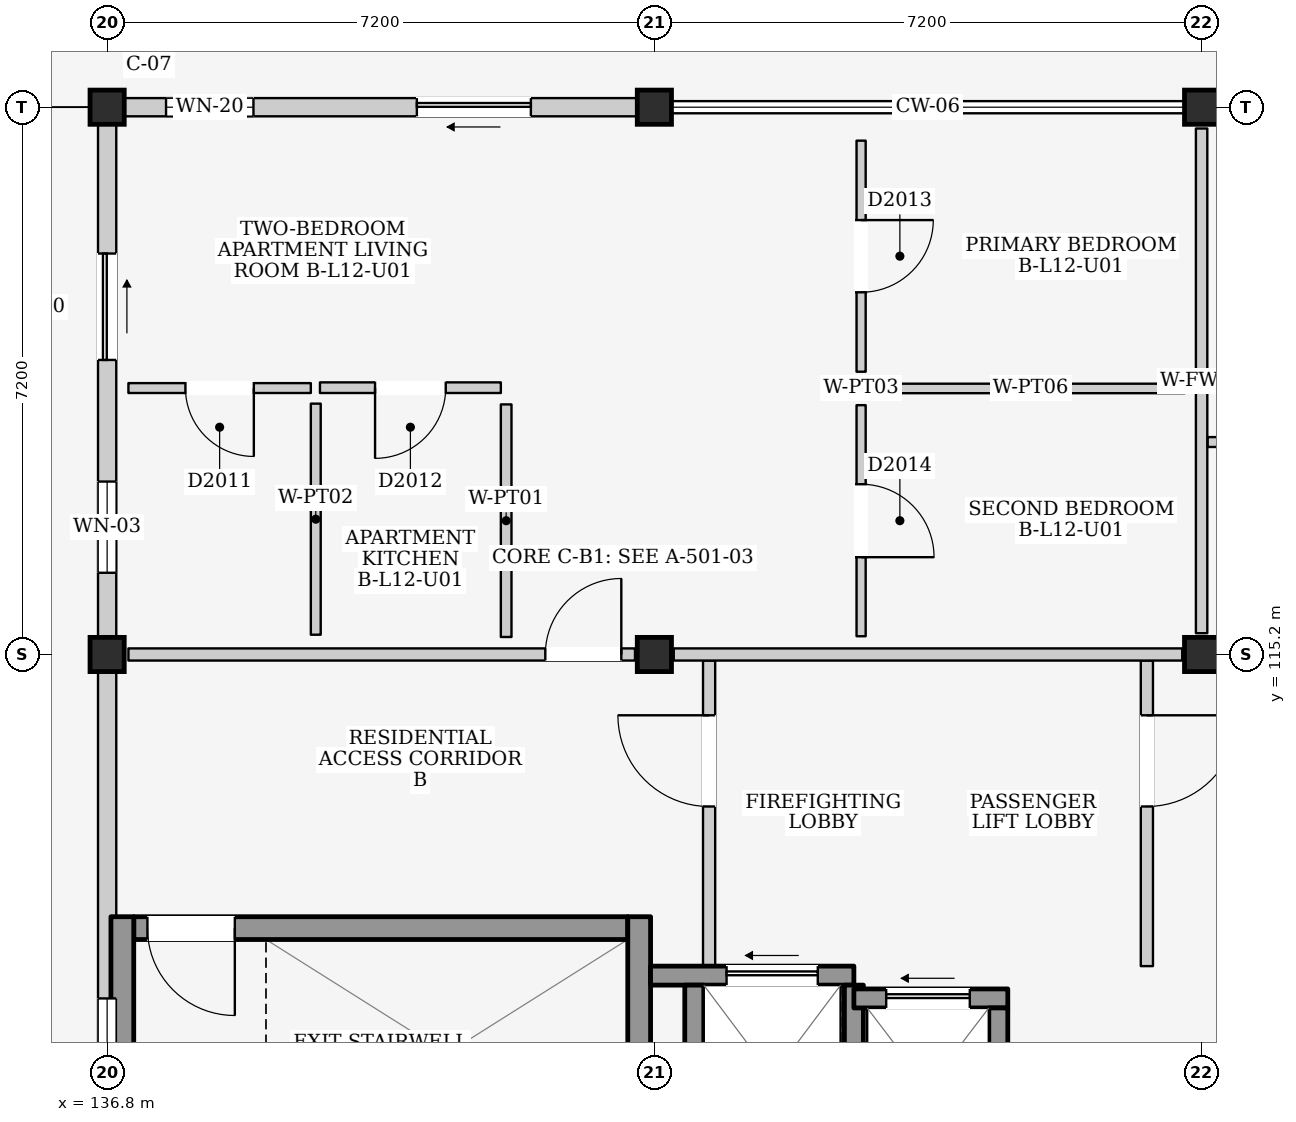
"""IFC4 building model, lengths in metres.
Left out: names, types, materials, properties, quantities, classifications, styles, units other than length and angle.
Written with IfcOpenShell. Run it as: python <this file> out.ifc"""

import sys

from ifc_helpers import new_model, si_unit, direction, frame, frame_2d, origin, origin_2d, place, context, subcontext, project, spatial, rectangle, extrude, element, fill, save


model = new_model("IFC4")
c1 = context("Model", 3, precision=1e-05, world=origin(), true_north=direction((0.0, 1.0)))
c2 = subcontext(c1, "Body", "Model", "MODEL_VIEW")
j1 = project(units=[si_unit("LENGTHUNIT", "METRE"), si_unit("PLANEANGLEUNIT", "RADIAN")], contexts=[c1])
p1 = place(None, origin())
s1 = spatial("IfcSite", under=j1, at=p1, CompositionType="ELEMENT")
p2 = place(p1, origin())
s2 = spatial("IfcBuilding", under=s1, at=p2, CompositionType="ELEMENT")
p3 = place(p2, frame((0.0, 0.0, 41.2)))
s3 = spatial("IfcBuildingStorey", under=s2, at=p3, CompositionType="ELEMENT", Elevation=41.2)
for number, where, z_axis, x_axis in (
    (1, (136.8, 115.2, 0.0), (0.0, 0.0, 1.0), (1.0, 0.0, 0.0)),
    (2, (136.8, 122.4, 0.0), (0.0, 0.0, 1.0), (1.0, 0.0, 0.0)),
    (3, (144.0, 115.2, 0.0), (0.0, 0.0, 1.0), (1.0, 0.0, 0.0)),
    (4, (144.0, 122.4, 0.0), (0.0, 0.0, 1.0), (1.0, 0.0, 0.0)),
    (5, (151.2, 115.2, 0.0), (0.0, 0.0, 1.0), (1.0, 0.0, 0.0)),
    (6, (151.2, 122.4, 0.0), (0.0, 0.0, 1.0), (1.0, 0.0, 0.0)),
):
    element("IfcColumn", number, at=place(p3, frame(where, z_axis=z_axis, x_axis=x_axis)), inside=s3, PredefinedType="COLUMN", context=c2, shape_type="SweptSolid", body=[
        extrude(rectangle(XDim=0.45, YDim=0.45, at=origin_2d()), origin(), (0.0, 0.0, 1.0), 3.2),
    ])
p4 = place(p3, frame((136.8, 108.225, 0.0), z_axis=(0.0, 0.0, 1.0), x_axis=(0.0, 1.0, 0.0)))
e7 = element("IfcWall", 7, at=p4, inside=s3, PredefinedType="ELEMENTEDWALL", context=c2, shape_type="SweptSolid", body=[
    extrude(rectangle(XDim=6.75, YDim=0.24, at=frame_2d((3.375, 0.0))), origin(), (0.0, 0.0, 1.0), 2.445),
])
p5 = place(p4, frame((1.45, 0.0, 1.2)))
e8 = element("IfcOpeningElement", 8, at=p5, cuts=e7, PredefinedType="OPENING", context=c2, shape_type="SweptSolid", body=[
    extrude(rectangle(XDim=1.0, YDim=0.9, at=frame_2d((0.5, 0.45))), frame((0.0, 0.135, 0.0), z_axis=(0.0, -1.0, 0.0), x_axis=(1.0, 0.0, 0.0)), (0.0, 0.0, 1.0), 0.27),
])
p6 = place(p3, frame((137.025, 122.4, 0.0), z_axis=(0.0, 0.0, 1.0), x_axis=(1.0, 0.0, 0.0)))
e9 = element("IfcWall", 9, at=p6, inside=s3, PredefinedType="ELEMENTEDWALL", context=c2, shape_type="SweptSolid", body=[
    extrude(rectangle(XDim=6.75, YDim=0.24, at=frame_2d((3.375, 0.0))), origin(), (0.0, 0.0, 1.0), 2.495),
])
p7 = place(p6, frame((3.85, 0.0, 0.0)))
e10 = element("IfcOpeningElement", 10, at=p7, cuts=e9, PredefinedType="OPENING", context=c2, shape_type="SweptSolid", body=[
    extrude(rectangle(XDim=1.5, YDim=2.12, at=frame_2d((0.75, 1.06))), frame((0.0, 0.135, 0.0), z_axis=(0.0, -1.0, 0.0), x_axis=(1.0, 0.0, 0.0)), (0.0, 0.0, 1.0), 0.27),
])
p8 = place(p6, frame((0.55, 0.0, 0.9)))
e11 = element("IfcOpeningElement", 11, at=p8, cuts=e9, PredefinedType="OPENING", context=c2, shape_type="SweptSolid", body=[
    extrude(rectangle(XDim=1.15, YDim=1.15, at=frame_2d((0.575, 0.575))), frame((0.0, 0.135, 0.0), z_axis=(0.0, -1.0, 0.0), x_axis=(1.0, 0.0, 0.0)), (0.0, 0.0, 1.0), 0.27),
])
p9 = place(p3, frame((136.8, 115.425, 0.0), z_axis=(0.0, 0.0, 1.0), x_axis=(0.0, 1.0, 0.0)))
e12 = element("IfcWall", 12, at=p9, inside=s3, PredefinedType="ELEMENTEDWALL", context=c2, shape_type="SweptSolid", body=[
    extrude(rectangle(XDim=6.75, YDim=0.24, at=frame_2d((3.375, 0.0))), origin(), (0.0, 0.0, 1.0), 2.445),
])
p10 = place(p9, frame((3.65, 0.0, 0.0)))
e13 = element("IfcOpeningElement", 13, at=p10, cuts=e12, PredefinedType="OPENING", context=c2, shape_type="SweptSolid", body=[
    extrude(rectangle(XDim=1.4, YDim=2.1, at=frame_2d((0.7, 1.05))), frame((0.0, 0.135, 0.0), z_axis=(0.0, -1.0, 0.0), x_axis=(1.0, 0.0, 0.0)), (0.0, 0.0, 1.0), 0.27),
])
p11 = place(p9, frame((0.85, 0.0, 0.95)))
e14 = element("IfcOpeningElement", 14, at=p11, cuts=e12, PredefinedType="OPENING", context=c2, shape_type="SweptSolid", body=[
    extrude(rectangle(XDim=1.2, YDim=1.35, at=frame_2d((0.6, 0.675))), frame((0.0, 0.135, 0.0), z_axis=(0.0, -1.0, 0.0), x_axis=(1.0, 0.0, 0.0)), (0.0, 0.0, 1.0), 0.27),
])
p12 = place(p3, frame((137.15, 111.6, 0.0), z_axis=(0.0, 0.0, 1.0), x_axis=(1.0, 0.0, 0.0)))
e15 = element("IfcWall", 15, at=p12, inside=s3, PredefinedType="SHEAR", context=c2, shape_type="SweptSolid", body=[
    extrude(rectangle(XDim=6.5, YDim=0.3, at=frame_2d((3.25, 0.0))), origin(), (0.0, 0.0, 1.0), 2.95),
])
p13 = place(p12, frame((0.18, 0.0, 0.0)))
e16 = element("IfcOpeningElement", 16, at=p13, cuts=e15, PredefinedType="OPENING", context=c2, shape_type="SweptSolid", body=[
    extrude(rectangle(XDim=1.15, YDim=2.2, at=frame_2d((0.575, 1.1))), frame((0.0, 0.165, 0.0), z_axis=(0.0, -1.0, 0.0), x_axis=(1.0, 0.0, 0.0)), (0.0, 0.0, 1.0), 0.33),
])
for number, where, z_axis, x_axis in (
    (17, (137.0, 108.15, 0.0), (0.0, 0.0, 1.0), (0.0, 1.0, 0.0)),
    (18, (143.8, 108.15, 0.0), (0.0, 0.0, 1.0), (0.0, 1.0, 0.0)),
):
    element("IfcWall", number, at=place(p3, frame(where, z_axis=z_axis, x_axis=x_axis)), inside=s3, PredefinedType="SHEAR", context=c2, shape_type="SweptSolid", body=[
        extrude(rectangle(XDim=3.6, YDim=0.3, at=frame_2d((1.8, 0.0))), origin(), (0.0, 0.0, 1.0), 2.95),
    ])
p14 = place(p3, frame((144.72, 111.1, 0.0), z_axis=(0.0, 0.0, 1.0), x_axis=(0.0, 1.0, 0.0)))
e19 = element("IfcWall", 19, at=p14, inside=s3, PredefinedType="PARTITIONING", context=c2, shape_type="SweptSolid", body=[
    extrude(rectangle(XDim=4.02, YDim=0.16, at=frame_2d((2.01, 0.0))), origin(), (0.0, 0.0, 1.0), 2.95),
])
p15 = place(p14, frame((2.1, 0.0, 0.0)))
e20 = element("IfcOpeningElement", 20, at=p15, cuts=e19, PredefinedType="OPENING", context=c2, shape_type="SweptSolid", body=[
    extrude(rectangle(XDim=1.2, YDim=2.2, at=frame_2d((0.6, 1.1))), frame((0.0, 0.095, 0.0), z_axis=(0.0, -1.0, 0.0), x_axis=(1.0, 0.0, 0.0)), (0.0, 0.0, 1.0), 0.19),
])
p16 = place(p3, frame((150.48, 111.1, 0.0), z_axis=(0.0, 0.0, 1.0), x_axis=(0.0, 1.0, 0.0)))
e21 = element("IfcWall", 21, at=p16, inside=s3, PredefinedType="PARTITIONING", context=c2, shape_type="SweptSolid", body=[
    extrude(rectangle(XDim=4.02, YDim=0.16, at=frame_2d((2.01, 0.0))), origin(), (0.0, 0.0, 1.0), 2.95),
])
p17 = place(p16, frame((2.1, 0.0, 0.0)))
e22 = element("IfcOpeningElement", 22, at=p17, cuts=e21, PredefinedType="OPENING", context=c2, shape_type="SweptSolid", body=[
    extrude(rectangle(XDim=1.2, YDim=2.2, at=frame_2d((0.6, 1.1))), frame((0.0, 0.095, 0.0), z_axis=(0.0, -1.0, 0.0), x_axis=(1.0, 0.0, 0.0)), (0.0, 0.0, 1.0), 0.19),
])
p18 = place(p3, frame((143.95, 110.975, 0.0), z_axis=(0.0, 0.0, 1.0), x_axis=(1.0, 0.0, 0.0)))
e23 = element("IfcWall", 23, at=p18, inside=s3, PredefinedType="SHEAR", context=c2, shape_type="SweptSolid", body=[
    extrude(rectangle(XDim=2.675, YDim=0.25, at=frame_2d((1.337, 0.0))), origin(), (0.0, 0.0, 1.0), 2.95),
])
p19 = place(p18, frame((1.0, 0.0, 0.0)))
e24 = element("IfcOpeningElement", 24, at=p19, cuts=e23, PredefinedType="OPENING", context=c2, shape_type="SweptSolid", body=[
    extrude(rectangle(XDim=1.2, YDim=2.25, at=frame_2d((0.6, 1.125))), frame((0.0, 0.14, 0.0), z_axis=(0.0, -1.0, 0.0), x_axis=(1.0, 0.0, 0.0)), (0.0, 0.0, 1.0), 0.28),
])
for number, where, z_axis, x_axis in (
    (25, (144.525, 108.45, 0.0), (0.0, 0.0, 1.0), (0.0, 1.0, 0.0)),
    (26, (146.625, 108.45, 0.0), (0.0, 0.0, 1.0), (0.0, 1.0, 0.0)),
):
    element("IfcWall", number, at=place(p3, frame(where, z_axis=z_axis, x_axis=x_axis)), inside=s3, PredefinedType="SHEAR", context=c2, shape_type="SweptSolid", body=[
        extrude(rectangle(XDim=2.4, YDim=0.25, at=frame_2d((1.2, 0.0))), origin(), (0.0, 0.0, 1.0), 2.95),
    ])
p20 = place(p3, frame((146.625, 110.675, 0.0), z_axis=(0.0, 0.0, 1.0), x_axis=(1.0, 0.0, 0.0)))
e27 = element("IfcWall", 27, at=p20, inside=s3, PredefinedType="SHEAR", context=c2, shape_type="SweptSolid", body=[
    extrude(rectangle(XDim=2.025, YDim=0.25, at=frame_2d((1.012, 0.0))), origin(), (0.0, 0.0, 1.0), 2.95),
])
p21 = place(p20, frame((0.425, 0.0, 0.0)))
e28 = element("IfcOpeningElement", 28, at=p21, cuts=e27, PredefinedType="OPENING", context=c2, shape_type="SweptSolid", body=[
    extrude(rectangle(XDim=1.1, YDim=2.15, at=frame_2d((0.55, 1.075))), frame((0.0, 0.14, 0.0), z_axis=(0.0, -1.0, 0.0), x_axis=(1.0, 0.0, 0.0)), (0.0, 0.0, 1.0), 0.28),
])
p22 = place(p3, frame((148.525, 108.45, 0.0), z_axis=(0.0, 0.0, 1.0), x_axis=(0.0, 1.0, 0.0)))
e29 = element("IfcWall", 29, at=p22, inside=s3, PredefinedType="SHEAR", context=c2, shape_type="SweptSolid", body=[
    extrude(rectangle(XDim=2.1, YDim=0.25, at=frame_2d((1.05, 0.0))), origin(), (0.0, 0.0, 1.0), 2.95),
])
p23 = place(p3, frame((137.08, 115.2, 0.0), z_axis=(0.0, 0.0, 1.0), x_axis=(1.0, 0.0, 0.0)))
e30 = element("IfcWall", 30, at=p23, inside=s3, PredefinedType="PARTITIONING", context=c2, shape_type="SweptSolid", body=[
    extrude(rectangle(XDim=6.665, YDim=0.16, at=frame_2d((3.333, 0.0))), origin(), (0.0, 0.0, 1.0), 2.345),
])
p24 = place(p23, frame((5.485, 0.0, 0.0)))
e31 = element("IfcOpeningElement", 31, at=p24, cuts=e30, PredefinedType="OPENING", context=c2, shape_type="SweptSolid", body=[
    extrude(rectangle(XDim=1.0, YDim=2.15, at=frame_2d((0.5, 1.075))), frame((0.0, 0.095, 0.0), z_axis=(0.0, -1.0, 0.0), x_axis=(1.0, 0.0, 0.0)), (0.0, 0.0, 1.0), 0.19),
])
p25 = place(p3, frame((144.255, 115.2, 0.0), z_axis=(0.0, 0.0, 1.0), x_axis=(1.0, 0.0, 0.0)))
e32 = element("IfcWall", 32, at=p25, inside=s3, PredefinedType="PARTITIONING", context=c2, shape_type="SweptSolid", body=[
    extrude(rectangle(XDim=6.69, YDim=0.16, at=frame_2d((3.345, 0.0))), origin(), (0.0, 0.0, 1.0), 2.345),
])
p26 = place(p3, frame((151.2, 115.48, 0.0), z_axis=(0.0, 0.0, 1.0), x_axis=(0.0, 1.0, 0.0)))
e33 = element("IfcWall", 33, at=p26, inside=s3, PredefinedType="PARTITIONING", context=c2, shape_type="SweptSolid", body=[
    extrude(rectangle(XDim=6.64, YDim=0.15, at=frame_2d((3.32, 0.0))), origin(), (0.0, 0.0, 1.0), 2.445),
])
p27 = place(p3, frame((137.08, 118.705, 0.0), z_axis=(0.0, 0.0, 1.0), x_axis=(1.0, 0.0, 0.0)))
e34 = element("IfcWall", 34, at=p27, inside=s3, PredefinedType="PARTITIONING", context=c2, shape_type="SweptSolid", body=[
    extrude(rectangle(XDim=2.4, YDim=0.13, at=frame_2d((1.2, 0.0))), origin(), (0.0, 0.0, 1.0), 2.95),
])
p28 = place(p27, frame((0.75, 0.0, 0.0)))
e35 = element("IfcOpeningElement", 35, at=p28, cuts=e34, PredefinedType="OPENING", context=c2, shape_type="SweptSolid", body=[
    extrude(rectangle(XDim=0.9, YDim=2.1, at=frame_2d((0.45, 1.05))), frame((0.0, 0.08, 0.0), z_axis=(0.0, -1.0, 0.0), x_axis=(1.0, 0.0, 0.0)), (0.0, 0.0, 1.0), 0.16),
])
p29 = place(p3, frame((139.545, 115.46, 0.0), z_axis=(0.0, 0.0, 1.0), x_axis=(0.0, 1.0, 0.0)))
e36 = element("IfcWall", 36, at=p29, inside=s3, PredefinedType="PARTITIONING", context=c2, shape_type="SweptSolid", body=[
    extrude(rectangle(XDim=3.04, YDim=0.13, at=frame_2d((1.52, 0.0))), origin(), (0.0, 0.0, 1.0), 2.95),
])
p30 = place(p3, frame((139.6, 118.71, 0.0), z_axis=(0.0, 0.0, 1.0), x_axis=(1.0, 0.0, 0.0)))
e37 = element("IfcWall", 37, at=p30, inside=s3, PredefinedType="PARTITIONING", context=c2, shape_type="SweptSolid", body=[
    extrude(rectangle(XDim=2.38, YDim=0.14, at=frame_2d((1.19, 0.0))), origin(), (0.0, 0.0, 1.0), 2.95),
])
p31 = place(p30, frame((0.725, 0.0, 0.0)))
e38 = element("IfcOpeningElement", 38, at=p31, cuts=e37, PredefinedType="OPENING", context=c2, shape_type="SweptSolid", body=[
    extrude(rectangle(XDim=0.93, YDim=2.14, at=frame_2d((0.465, 1.07))), frame((0.0, 0.085, 0.0), z_axis=(0.0, -1.0, 0.0), x_axis=(1.0, 0.0, 0.0)), (0.0, 0.0, 1.0), 0.17),
])
p32 = place(p3, frame((142.05, 115.43, 0.0), z_axis=(0.0, 0.0, 1.0), x_axis=(0.0, 1.0, 0.0)))
e39 = element("IfcWall", 39, at=p32, inside=s3, PredefinedType="PARTITIONING", context=c2, shape_type="SweptSolid", body=[
    extrude(rectangle(XDim=3.06, YDim=0.14, at=frame_2d((1.53, 0.0))), origin(), (0.0, 0.0, 1.0), 2.95),
])
p33 = place(p3, frame((146.72, 118.92, 0.0), z_axis=(0.0, 0.0, 1.0), x_axis=(0.0, 1.0, 0.0)))
e40 = element("IfcWall", 40, at=p33, inside=s3, PredefinedType="PARTITIONING", context=c2, shape_type="SweptSolid", body=[
    extrude(rectangle(XDim=3.04, YDim=0.12, at=frame_2d((1.52, 0.0))), origin(), (0.0, 0.0, 1.0), 2.95),
])
p34 = place(p33, frame((1.045, 0.0, 0.0)))
e41 = element("IfcOpeningElement", 41, at=p34, cuts=e40, PredefinedType="OPENING", context=c2, shape_type="SweptSolid", body=[
    extrude(rectangle(XDim=0.95, YDim=2.15, at=frame_2d((0.475, 1.075))), frame((0.0, 0.075, 0.0), z_axis=(0.0, -1.0, 0.0), x_axis=(1.0, 0.0, 0.0)), (0.0, 0.0, 1.0), 0.15),
])
p35 = place(p3, frame((146.92, 118.7, 0.0), z_axis=(0.0, 0.0, 1.0), x_axis=(1.0, 0.0, 0.0)))
e42 = element("IfcWall", 42, at=p35, inside=s3, PredefinedType="PARTITIONING", context=c2, shape_type="SweptSolid", body=[
    extrude(rectangle(XDim=4.06, YDim=0.125, at=frame_2d((2.03, 0.0))), origin(), (0.0, 0.0, 1.0), 2.95),
])
p36 = place(p3, frame((146.72, 115.44, 0.0), z_axis=(0.0, 0.0, 1.0), x_axis=(0.0, 1.0, 0.0)))
e43 = element("IfcWall", 43, at=p36, inside=s3, PredefinedType="PARTITIONING", context=c2, shape_type="SweptSolid", body=[
    extrude(rectangle(XDim=3.04, YDim=0.12, at=frame_2d((1.52, 0.0))), origin(), (0.0, 0.0, 1.0), 2.95),
])
p37 = place(p36, frame((1.04, 0.0, 0.0)))
e44 = element("IfcOpeningElement", 44, at=p37, cuts=e43, PredefinedType="OPENING", context=c2, shape_type="SweptSolid", body=[
    extrude(rectangle(XDim=0.96, YDim=2.15, at=frame_2d((0.48, 1.075))), frame((0.0, 0.075, 0.0), z_axis=(0.0, -1.0, 0.0), x_axis=(1.0, 0.0, 0.0)), (0.0, 0.0, 1.0), 0.15),
])
p38 = place(p3, frame((151.28, 117.995, 0.0), z_axis=(0.0, 0.0, 1.0), x_axis=(1.0, 0.0, 0.0)))
e45 = element("IfcWall", 45, at=p38, inside=s3, PredefinedType="PARTITIONING", context=c2, shape_type="SweptSolid", body=[
    extrude(rectangle(XDim=2.35, YDim=0.13, at=frame_2d((1.175, 0.0))), origin(), (0.0, 0.0, 1.0), 2.95),
])
p39 = place(p38, frame((0.725, 0.0, 0.0)))
e46 = element("IfcOpeningElement", 46, at=p39, cuts=e45, PredefinedType="OPENING", context=c2, shape_type="SweptSolid", body=[
    extrude(rectangle(XDim=0.9, YDim=2.1, at=frame_2d((0.45, 1.05))), frame((0.0, 0.08, 0.0), z_axis=(0.0, -1.0, 0.0), x_axis=(1.0, 0.0, 0.0)), (0.0, 0.0, 1.0), 0.16),
])
p40 = place(p5, origin())
e47 = element("IfcWindow", 47, at=p40, inside=s3, PartitioningType="SINGLE_PANEL", PredefinedType="WINDOW", context=c2, shape_type="SweptSolid", body=[
    extrude(rectangle(XDim=1.0, YDim=0.9, at=frame_2d((0.5, 0.45))), frame((0.0, 0.03, 0.0), z_axis=(0.0, -1.0, 0.0), x_axis=(1.0, 0.0, 0.0)), (0.0, 0.0, 1.0), 0.06),
])
fill(e8, e47)
p41 = place(p7, frame((1.5, 0.0, 0.0), z_axis=(0.0, 0.0, 1.0), x_axis=(-1.0, 0.0, 0.0)))
e48 = element("IfcDoor", 48, at=p41, inside=s3, OperationType="SLIDING_TO_LEFT", PredefinedType="DOOR", context=c2, shape_type="SweptSolid", body=[
    extrude(rectangle(XDim=1.5, YDim=2.12, at=frame_2d((0.75, 1.06))), frame((0.0, 0.025, 0.0), z_axis=(0.0, -1.0, 0.0), x_axis=(1.0, 0.0, 0.0)), (0.0, 0.0, 1.0), 0.05),
])
fill(e10, e48)
p42 = place(p8, origin())
e49 = element("IfcWindow", 49, at=p42, inside=s3, PartitioningType="SINGLE_PANEL", PredefinedType="WINDOW", context=c2, shape_type="SweptSolid", body=[
    extrude(rectangle(XDim=1.15, YDim=1.15, at=frame_2d((0.575, 0.575))), frame((0.0, 0.03, 0.0), z_axis=(0.0, -1.0, 0.0), x_axis=(1.0, 0.0, 0.0)), (0.0, 0.0, 1.0), 0.06),
])
fill(e11, e49)
p43 = place(p10, frame((1.4, 0.0, 0.0), z_axis=(0.0, 0.0, 1.0), x_axis=(-1.0, 0.0, 0.0)))
e50 = element("IfcDoor", 50, at=p43, inside=s3, OperationType="SLIDING_TO_RIGHT", PredefinedType="DOOR", context=c2, shape_type="SweptSolid", body=[
    extrude(rectangle(XDim=1.4, YDim=2.1, at=frame_2d((0.7, 1.05))), frame((0.0, 0.025, 0.0), z_axis=(0.0, -1.0, 0.0), x_axis=(1.0, 0.0, 0.0)), (0.0, 0.0, 1.0), 0.05),
])
fill(e13, e50)
p44 = place(p11, origin())
e51 = element("IfcWindow", 51, at=p44, inside=s3, PartitioningType="SINGLE_PANEL", PredefinedType="WINDOW", context=c2, shape_type="SweptSolid", body=[
    extrude(rectangle(XDim=1.2, YDim=1.35, at=frame_2d((0.6, 0.675))), frame((0.0, 0.03, 0.0), z_axis=(0.0, -1.0, 0.0), x_axis=(1.0, 0.0, 0.0)), (0.0, 0.0, 1.0), 0.06),
])
fill(e14, e51)
p45 = place(p13, frame((1.15, 0.0, 0.0), z_axis=(0.0, 0.0, 1.0), x_axis=(-1.0, 0.0, 0.0)))
e52 = element("IfcDoor", 52, at=p45, inside=s3, OperationType="SINGLE_SWING_LEFT", PredefinedType="DOOR", context=c2, shape_type="SweptSolid", body=[
    extrude(rectangle(XDim=1.15, YDim=2.2, at=frame_2d((0.575, 1.1))), frame((0.0, 0.025, 0.0), z_axis=(0.0, -1.0, 0.0), x_axis=(1.0, 0.0, 0.0)), (0.0, 0.0, 1.0), 0.05),
])
fill(e16, e52)
p46 = place(p15, origin())
e53 = element("IfcDoor", 53, at=p46, inside=s3, OperationType="SINGLE_SWING_RIGHT", PredefinedType="DOOR", context=c2, shape_type="SweptSolid", body=[
    extrude(rectangle(XDim=1.2, YDim=2.2, at=frame_2d((0.6, 1.1))), frame((0.0, 0.025, 0.0), z_axis=(0.0, -1.0, 0.0), x_axis=(1.0, 0.0, 0.0)), (0.0, 0.0, 1.0), 0.05),
])
fill(e20, e53)
p47 = place(p17, frame((1.2, 0.0, 0.0), z_axis=(0.0, 0.0, 1.0), x_axis=(-1.0, 0.0, 0.0)))
e54 = element("IfcDoor", 54, at=p47, inside=s3, OperationType="SINGLE_SWING_LEFT", PredefinedType="DOOR", context=c2, shape_type="SweptSolid", body=[
    extrude(rectangle(XDim=1.2, YDim=2.2, at=frame_2d((0.6, 1.1))), frame((0.0, 0.025, 0.0), z_axis=(0.0, -1.0, 0.0), x_axis=(1.0, 0.0, 0.0)), (0.0, 0.0, 1.0), 0.05),
])
fill(e22, e54)
p48 = place(p19, origin())
e55 = element("IfcDoor", 55, at=p48, inside=s3, OperationType="SLIDING_TO_LEFT", PredefinedType="DOOR", context=c2, shape_type="SweptSolid", body=[
    extrude(rectangle(XDim=1.2, YDim=2.25, at=frame_2d((0.6, 1.125))), frame((0.0, 0.025, 0.0), z_axis=(0.0, -1.0, 0.0), x_axis=(1.0, 0.0, 0.0)), (0.0, 0.0, 1.0), 0.05),
])
fill(e24, e55)
p49 = place(p21, origin())
e56 = element("IfcDoor", 56, at=p49, inside=s3, OperationType="SLIDING_TO_LEFT", PredefinedType="DOOR", context=c2, shape_type="SweptSolid", body=[
    extrude(rectangle(XDim=1.1, YDim=2.15, at=frame_2d((0.55, 1.075))), frame((0.0, 0.025, 0.0), z_axis=(0.0, -1.0, 0.0), x_axis=(1.0, 0.0, 0.0)), (0.0, 0.0, 1.0), 0.05),
])
fill(e28, e56)
p50 = place(p24, origin())
e57 = element("IfcDoor", 57, at=p50, inside=s3, OperationType="SINGLE_SWING_RIGHT", PredefinedType="DOOR", context=c2, shape_type="SweptSolid", body=[
    extrude(rectangle(XDim=1.0, YDim=2.15, at=frame_2d((0.5, 1.075))), frame((0.0, 0.025, 0.0), z_axis=(0.0, -1.0, 0.0), x_axis=(1.0, 0.0, 0.0)), (0.0, 0.0, 1.0), 0.05),
])
fill(e31, e57)
p51 = place(p28, frame((0.9, 0.0, 0.0), z_axis=(0.0, 0.0, 1.0), x_axis=(-1.0, 0.0, 0.0)))
e58 = element("IfcDoor", 58, at=p51, inside=s3, OperationType="SINGLE_SWING_LEFT", PredefinedType="DOOR", context=c2, shape_type="SweptSolid", body=[
    extrude(rectangle(XDim=0.9, YDim=2.1, at=frame_2d((0.45, 1.05))), frame((0.0, 0.025, 0.0), z_axis=(0.0, -1.0, 0.0), x_axis=(1.0, 0.0, 0.0)), (0.0, 0.0, 1.0), 0.05),
])
fill(e35, e58)
p52 = place(p31, frame((0.93, 0.0, 0.0), z_axis=(0.0, 0.0, 1.0), x_axis=(-1.0, 0.0, 0.0)))
e59 = element("IfcDoor", 59, at=p52, inside=s3, OperationType="SINGLE_SWING_RIGHT", PredefinedType="DOOR", context=c2, shape_type="SweptSolid", body=[
    extrude(rectangle(XDim=0.93, YDim=2.14, at=frame_2d((0.465, 1.07))), frame((0.0, 0.025, 0.0), z_axis=(0.0, -1.0, 0.0), x_axis=(1.0, 0.0, 0.0)), (0.0, 0.0, 1.0), 0.05),
])
fill(e38, e59)
p53 = place(p34, frame((0.95, 0.0, 0.0), z_axis=(0.0, 0.0, 1.0), x_axis=(-1.0, 0.0, 0.0)))
e60 = element("IfcDoor", 60, at=p53, inside=s3, OperationType="SINGLE_SWING_LEFT", PredefinedType="DOOR", context=c2, shape_type="SweptSolid", body=[
    extrude(rectangle(XDim=0.95, YDim=2.15, at=frame_2d((0.475, 1.075))), frame((0.0, 0.025, 0.0), z_axis=(0.0, -1.0, 0.0), x_axis=(1.0, 0.0, 0.0)), (0.0, 0.0, 1.0), 0.05),
])
fill(e41, e60)
p54 = place(p37, frame((0.96, 0.0, 0.0), z_axis=(0.0, 0.0, 1.0), x_axis=(-1.0, 0.0, 0.0)))
e61 = element("IfcDoor", 61, at=p54, inside=s3, OperationType="SINGLE_SWING_RIGHT", PredefinedType="DOOR", context=c2, shape_type="SweptSolid", body=[
    extrude(rectangle(XDim=0.96, YDim=2.15, at=frame_2d((0.48, 1.075))), frame((0.0, 0.025, 0.0), z_axis=(0.0, -1.0, 0.0), x_axis=(1.0, 0.0, 0.0)), (0.0, 0.0, 1.0), 0.05),
])
fill(e44, e61)
save(model, sys.argv[1])
